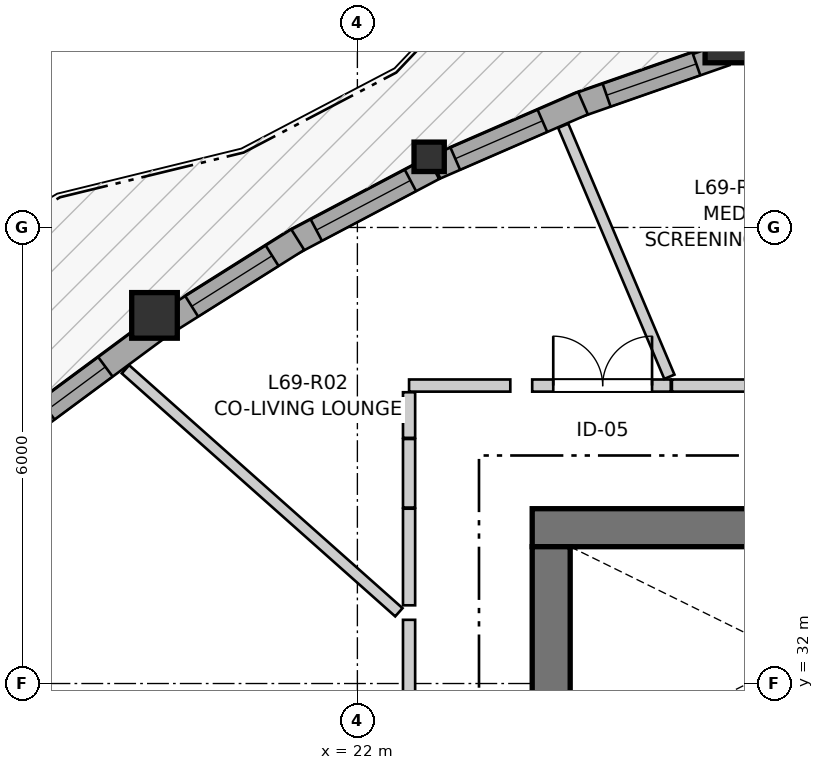
"""IFC4 building model, lengths in metres.
Left out: names, types, materials, properties, quantities, classifications, styles, units other than length and angle.
Written with IfcOpenShell. Run it as: python <this file> out.ifc"""

import sys

from ifc_helpers import new_model, si_unit, direction, frame, frame_2d, origin, origin_2d, place, context, subcontext, project, spatial, rectangle, i_section, extrude, source, transform, mapped, element, fill, save


model = new_model("IFC4")
c1 = context("Model", 3, precision=1e-05, world=origin(), true_north=direction((0.0, 1.0)))
c2 = subcontext(c1, "Body", "Model", "MODEL_VIEW")
j1 = project(units=[si_unit("LENGTHUNIT", "METRE"), si_unit("PLANEANGLEUNIT", "RADIAN")], contexts=[c1])
p1 = place(None, origin())
s1 = spatial("IfcSite", under=j1, at=p1, CompositionType="ELEMENT")
p2 = place(p1, origin())
s2 = spatial("IfcBuilding", under=s1, at=p2, CompositionType="ELEMENT")
p3 = place(p2, frame((0.0, 0.0, 230.8)))
s3 = spatial("IfcBuildingStorey", under=s2, at=p3, CompositionType="ELEMENT", Elevation=230.8)
p4 = place(p3, frame((36.4, 34.05, 0.0), z_axis=(0.0, 0.0, 1.0), x_axis=(-1.0, 0.0, 0.0)))
e1 = element("IfcWall", 1, at=p4, inside=s3, PredefinedType="SHEAR", context=c2, shape_type="SweptSolid", body=[
    extrude(rectangle(XDim=12.1, YDim=0.5, at=frame_2d((6.05, 0.0))), origin(), (0.0, 0.0, 1.0), 2.96),
])
p5 = place(p3, frame((24.55, 33.8, 0.0), z_axis=(0.0, 0.0, 1.0), x_axis=(0.0, -1.0, 0.0)))
e2 = element("IfcWall", 2, at=p5, inside=s3, PredefinedType="SHEAR", context=c2, shape_type="SweptSolid", body=[
    extrude(rectangle(XDim=15.6, YDim=0.5, at=frame_2d((7.8, 0.0))), origin(), (0.0, 0.0, 1.0), 2.96),
])
p6 = place(p5, frame((7.05, 0.0, 0.0)))
e3 = element("IfcOpeningElement", 3, at=p6, cuts=e2, PredefinedType="OPENING", context=c2, shape_type="SweptSolid", body=[
    extrude(rectangle(XDim=1.5, YDim=2.15, at=frame_2d((0.75, 1.075))), frame((0.0, 0.26, 0.0), z_axis=(0.0, -1.0, 0.0), x_axis=(1.0, 0.0, 0.0)), (0.0, 0.0, 1.0), 0.52),
])
p7 = place(p5, frame((3.52, 0.0, 0.0)))
e4 = element("IfcOpeningElement", 4, at=p7, cuts=e2, PredefinedType="OPENING", context=c2, shape_type="SweptSolid", body=[
    extrude(rectangle(XDim=0.86, YDim=2.05, at=frame_2d((0.43, 1.025))), frame((0.0, 0.26, 0.0), z_axis=(0.0, -1.0, 0.0), x_axis=(1.0, 0.0, 0.0)), (0.0, 0.0, 1.0), 0.52),
])
p8 = place(p5, frame((11.22, 0.0, 0.0)))
e5 = element("IfcOpeningElement", 5, at=p8, cuts=e2, PredefinedType="OPENING", context=c2, shape_type="SweptSolid", body=[
    extrude(rectangle(XDim=0.86, YDim=2.05, at=frame_2d((0.43, 1.025))), frame((0.0, 0.26, 0.0), z_axis=(0.0, -1.0, 0.0), x_axis=(1.0, 0.0, 0.0)), (0.0, 0.0, 1.0), 0.52),
])
m1 = source(origin(), c2, "Body", "SweptSolid", [
    extrude(rectangle(XDim=0.6, YDim=0.6, at=origin_2d()), origin(), (0.0, 0.0, 1.0), 2.96),
])
p9 = place(p3, frame((26.875, 40.467, 0.0), z_axis=(0.0, 0.0, 1.0), x_axis=(1.0, 0.0, 0.0)))
e6 = element("IfcColumn", 6, at=p9, inside=s3, PredefinedType="COLUMN", context=c2, shape_type="MappedRepresentation", body=[
    mapped(m1, transform((0.0, 0.0, 0.0), x_axis=(1.0, 0.0, 0.0), y_axis=(0.0, 1.0, 0.0), z_axis=(0.0, 0.0, 1.0), scale=1.0)),
])
m2 = source(origin(), c2, "Body", "SweptSolid", [
    extrude(i_section(OverallWidth=0.398, OverallDepth=0.387, WebThickness=0.019, FlangeThickness=0.03, FilletRadius=0.015, at=origin_2d()), origin(), (0.0, 0.0, 1.0), 2.96),
])
p10 = place(p3, frame((22.944, 38.929, 0.0), z_axis=(0.0, 0.0, 1.0), x_axis=(1.0, 0.0, 0.0)))
e7 = element("IfcColumn", 7, at=p10, inside=s3, PredefinedType="PILASTER", context=c2, shape_type="MappedRepresentation", body=[
    mapped(m2, transform((0.0, 0.0, 0.0), x_axis=(1.0, 0.0, 0.0), y_axis=(0.0, 1.0, 0.0), z_axis=(0.0, 0.0, 1.0), scale=1.0)),
])
p11 = place(p3, frame((19.331, 36.843, 0.0), z_axis=(0.0, 0.0, 1.0), x_axis=(1.0, 0.0, 0.0)))
e8 = element("IfcColumn", 8, at=p11, inside=s3, PredefinedType="COLUMN", context=c2, shape_type="MappedRepresentation", body=[
    mapped(m1, transform((0.0, 0.0, 0.0), x_axis=(1.0, 0.0, 0.0), y_axis=(0.0, 1.0, 0.0), z_axis=(0.0, 0.0, 1.0), scale=1.0)),
])
p12 = place(p3, frame((29.037, 40.885, 0.0), z_axis=(0.0, 0.0, 1.0), x_axis=(-0.965439872052, -0.260625887918, 0.0)))
e9 = element("IfcWall", 9, at=p12, inside=s3, PredefinedType="SOLIDWALL", context=c2, shape_type="SweptSolid", body=[
    extrude(rectangle(XDim=2.107, YDim=0.32, at=frame_2d((1.053, 0.0))), origin(), (0.0, 0.0, 1.0), 2.58),
])
p13 = place(p12, frame((0.24, 0.0, 0.0)))
e10 = element("IfcOpeningElement", 10, at=p13, cuts=e9, PredefinedType="OPENING", context=c2, shape_type="SweptSolid", body=[
    extrude(rectangle(XDim=1.0, YDim=2.1, at=frame_2d((0.5, 1.05))), frame((0.0, 0.17, 0.0), z_axis=(0.0, -1.0, 0.0), x_axis=(1.0, 0.0, 0.0)), (0.0, 0.0, 1.0), 0.34),
])
p14 = place(p3, frame((26.843, 40.286, 0.0), z_axis=(0.0, 0.0, 1.0), x_axis=(-0.944109796758, -0.329631144867, 0.0)))
e11 = element("IfcWall", 11, at=p14, inside=s3, PredefinedType="SOLIDWALL", context=c2, shape_type="SweptSolid", body=[
    extrude(rectangle(XDim=2.072, YDim=0.32, at=frame_2d((1.036, 0.0))), origin(), (0.0, 0.0, 1.0), 2.58),
])
p15 = place(p14, frame((0.406, 0.0, 0.82)))
e12 = element("IfcOpeningElement", 12, at=p15, cuts=e11, PredefinedType="OPENING", context=c2, shape_type="SweptSolid", body=[
    extrude(rectangle(XDim=1.25, YDim=1.35, at=frame_2d((0.625, 0.675))), frame((0.0, 0.17, 0.0), z_axis=(0.0, -1.0, 0.0), x_axis=(1.0, 0.0, 0.0)), (0.0, 0.0, 1.0), 0.34),
])
p16 = place(p3, frame((24.969, 39.635, 0.0), z_axis=(0.0, 0.0, 1.0), x_axis=(-0.917099379281, -0.398658661666, 0.0)))
e13 = element("IfcWall", 13, at=p16, inside=s3, PredefinedType="SOLIDWALL", context=c2, shape_type="SweptSolid", body=[
    extrude(rectangle(XDim=2.118, YDim=0.32, at=frame_2d((1.059, 0.0))), origin(), (0.0, 0.0, 1.0), 2.58),
])
p17 = place(p16, frame((0.582, 0.0, 0.82)))
e14 = element("IfcOpeningElement", 14, at=p17, cuts=e13, PredefinedType="OPENING", context=c2, shape_type="SweptSolid", body=[
    extrude(rectangle(XDim=1.25, YDim=1.35, at=frame_2d((0.625, 0.675))), frame((0.0, 0.17, 0.0), z_axis=(0.0, -1.0, 0.0), x_axis=(1.0, 0.0, 0.0)), (0.0, 0.0, 1.0), 0.34),
])
p18 = place(p3, frame((23.001, 38.779, 0.0), z_axis=(0.0, 0.0, 1.0), x_axis=(-0.884379435148, -0.466768695059, 0.0)))
e15 = element("IfcWall", 15, at=p18, inside=s3, PredefinedType="SOLIDWALL", context=c2, shape_type="SweptSolid", body=[
    extrude(rectangle(XDim=2.106, YDim=0.32, at=frame_2d((1.053, 0.0))), origin(), (0.0, 0.0, 1.0), 2.58),
])
p19 = place(p18, frame((0.343, 0.0, 0.82)))
e16 = element("IfcOpeningElement", 16, at=p19, cuts=e15, PredefinedType="OPENING", context=c2, shape_type="SweptSolid", body=[
    extrude(rectangle(XDim=1.4, YDim=1.35, at=frame_2d((0.7, 0.675))), frame((0.0, 0.17, 0.0), z_axis=(0.0, -1.0, 0.0), x_axis=(1.0, 0.0, 0.0)), (0.0, 0.0, 1.0), 0.34),
])
p20 = place(p3, frame((21.215, 37.84, 0.0), z_axis=(0.0, 0.0, 1.0), x_axis=(-0.846356989859, -0.532616039672, 0.0)))
e17 = element("IfcWall", 17, at=p20, inside=s3, PredefinedType="SOLIDWALL", context=c2, shape_type="SweptSolid", body=[
    extrude(rectangle(XDim=2.036, YDim=0.32, at=frame_2d((1.018, 0.0))), origin(), (0.0, 0.0, 1.0), 2.58),
])
p21 = place(p20, frame((0.398, 0.0, 0.82)))
e18 = element("IfcOpeningElement", 18, at=p21, cuts=e17, PredefinedType="OPENING", context=c2, shape_type="SweptSolid", body=[
    extrude(rectangle(XDim=1.25, YDim=1.35, at=frame_2d((0.625, 0.675))), frame((0.0, 0.17, 0.0), z_axis=(0.0, -1.0, 0.0), x_axis=(1.0, 0.0, 0.0)), (0.0, 0.0, 1.0), 0.34),
])
p22 = place(p3, frame((19.354, 36.661, 0.0), z_axis=(0.0, 0.0, 1.0), x_axis=(-0.803846460046, -0.59483684206, 0.0)))
e19 = element("IfcWall", 19, at=p22, inside=s3, PredefinedType="SOLIDWALL", context=c2, shape_type="SweptSolid", body=[
    extrude(rectangle(XDim=2.048, YDim=0.32, at=frame_2d((1.024, 0.0))), origin(), (0.0, 0.0, 1.0), 2.58),
])
p23 = place(p22, frame((0.832, 0.0, 0.82)))
e20 = element("IfcOpeningElement", 20, at=p23, cuts=e19, PredefinedType="OPENING", context=c2, shape_type="SweptSolid", body=[
    extrude(rectangle(XDim=0.95, YDim=1.35, at=frame_2d((0.475, 0.675))), frame((0.0, 0.17, 0.0), z_axis=(0.0, -1.0, 0.0), x_axis=(1.0, 0.0, 0.0)), (0.0, 0.0, 1.0), 0.34),
])
p24 = place(p3, frame((26.138, 35.92, 0.0), z_axis=(0.0, 0.0, 1.0), x_axis=(1.0, 0.0, 0.0)))
e21 = element("IfcWall", 21, at=p24, inside=s3, PredefinedType="PARTITIONING", context=c2, shape_type="SweptSolid", body=[
    extrude(rectangle(XDim=5.328, YDim=0.16, at=frame_2d((2.664, 0.0))), origin(), (0.0, 0.0, 1.0), 2.96),
])
p25 = place(p24, frame((2.185, 0.0, 0.0)))
e22 = element("IfcOpeningElement", 22, at=p25, cuts=e21, PredefinedType="OPENING", context=c2, shape_type="SweptSolid", body=[
    extrude(rectangle(XDim=0.96, YDim=2.1, at=frame_2d((0.48, 1.05))), frame((0.0, 0.09, 0.0), z_axis=(0.0, -1.0, 0.0), x_axis=(1.0, 0.0, 0.0)), (0.0, 0.0, 1.0), 0.18),
])
p26 = place(p3, frame((22.68, 27.85, 0.0), z_axis=(0.0, 0.0, 1.0), x_axis=(0.0, 1.0, 0.0)))
e23 = element("IfcWall", 23, at=p26, inside=s3, PredefinedType="PARTITIONING", context=c2, shape_type="SweptSolid", body=[
    extrude(rectangle(XDim=4.988, YDim=0.16, at=frame_2d((2.494, 0.0))), origin(), (0.0, 0.0, 1.0), 2.96),
])
p27 = place(p26, frame((2.033, 0.0, 0.0)))
e24 = element("IfcOpeningElement", 24, at=p27, cuts=e23, PredefinedType="OPENING", context=c2, shape_type="SweptSolid", body=[
    extrude(rectangle(XDim=0.96, YDim=2.1, at=frame_2d((0.48, 1.05))), frame((0.0, 0.09, 0.0), z_axis=(0.0, -1.0, 0.0), x_axis=(1.0, 0.0, 0.0)), (0.0, 0.0, 1.0), 0.18),
])
p28 = place(p3, frame((24.3, 35.92, 0.0), z_axis=(0.0, 0.0, 1.0), x_axis=(1.0, 0.0, 0.0)))
e25 = element("IfcWall", 25, at=p28, inside=s3, PredefinedType="PARTITIONING", context=c2, shape_type="SweptSolid", body=[
    extrude(rectangle(XDim=1.823, YDim=0.16, at=frame_2d((0.912, 0.0))), origin(), (0.0, 0.0, 1.0), 2.96),
])
p29 = place(p28, frame((0.277, 0.0, 0.0)))
e26 = element("IfcOpeningElement", 26, at=p29, cuts=e25, PredefinedType="OPENING", context=c2, shape_type="SweptSolid", body=[
    extrude(rectangle(XDim=1.3, YDim=2.1, at=frame_2d((0.65, 1.05))), frame((0.0, 0.09, 0.0), z_axis=(0.0, -1.0, 0.0), x_axis=(1.0, 0.0, 0.0)), (0.0, 0.0, 1.0), 0.18),
])
p30 = place(p3, frame((18.949, 36.134, 0.0), z_axis=(0.0, 0.0, 1.0), x_axis=(0.747482088067, -0.664281964243, 0.0)))
e27 = element("IfcWall", 27, at=p30, inside=s3, PredefinedType="PARTITIONING", context=c2, shape_type="SweptSolid", body=[
    extrude(rectangle(XDim=4.812, YDim=0.145, at=frame_2d((2.406, 0.0))), origin(), (0.0, 0.0, 1.0), 2.96),
])
p31 = place(p3, frame((24.708, 39.338, 0.0), z_axis=(0.0, 0.0, 1.0), x_axis=(0.389551136954, -0.921004838043, 0.0)))
e28 = element("IfcWall", 28, at=p31, inside=s3, PredefinedType="PARTITIONING", context=c2, shape_type="SweptSolid", body=[
    extrude(rectangle(XDim=3.585, YDim=0.145, at=frame_2d((1.793, 0.0))), origin(), (0.0, 0.0, 1.0), 2.96),
])
p32 = place(p3, frame((22.68, 33.029, 0.0), z_axis=(0.0, 0.0, 1.0), x_axis=(0.0, 1.0, 0.0)))
e29 = element("IfcWall", 29, at=p32, inside=s3, PredefinedType="PARTITIONING", context=c2, shape_type="SweptSolid", body=[
    extrude(rectangle(XDim=1.271, YDim=0.16, at=frame_2d((0.635, 0.0))), origin(), (0.0, 0.0, 1.0), 2.628),
])
p33 = place(p3, frame((22.68, 35.92, 0.0), z_axis=(0.0, 0.0, 1.0), x_axis=(1.0, 0.0, 0.0)))
e30 = element("IfcWall", 30, at=p33, inside=s3, PredefinedType="PARTITIONING", context=c2, shape_type="SweptSolid", body=[
    extrude(rectangle(XDim=1.332, YDim=0.16, at=frame_2d((0.666, 0.0))), origin(), (0.0, 0.0, 1.0), 2.96),
])
p34 = place(p3, frame((22.68, 34.315, 0.0), z_axis=(0.0, 0.0, 1.0), x_axis=(0.0, 1.0, 0.0)))
e31 = element("IfcWall", 31, at=p34, inside=s3, PredefinedType="PARTITIONING", context=c2, shape_type="SweptSolid", body=[
    extrude(rectangle(XDim=0.902, YDim=0.16, at=frame_2d((0.451, 0.0))), origin(), (0.0, 0.0, 1.0), 2.96),
])
p35 = place(p3, frame((22.68, 35.232, 0.0), z_axis=(0.0, 0.0, 1.0), x_axis=(0.0, 1.0, 0.0)))
e32 = element("IfcWall", 32, at=p35, inside=s3, PredefinedType="PARTITIONING", context=c2, shape_type="SweptSolid", body=[
    extrude(rectangle(XDim=0.6, YDim=0.16, at=frame_2d((0.3, 0.0))), origin(), (0.0, 0.0, 1.0), 2.96),
])
m3 = source(origin(), c2, "Body", "SweptSolid", [
    extrude(rectangle(XDim=1.25, YDim=1.35, at=frame_2d((0.625, 0.675))), frame((0.0, 0.03, 0.0), z_axis=(0.0, -1.0, 0.0), x_axis=(1.0, 0.0, 0.0)), (0.0, 0.0, 1.0), 0.06),
])
p36 = place(p15, origin())
e33 = element("IfcWindow", 33, at=p36, inside=s3, PartitioningType="SINGLE_PANEL", PredefinedType="WINDOW", context=c2, shape_type="MappedRepresentation", body=[
    mapped(m3, transform((0.0, 0.0, 0.0), x_axis=(1.0, 0.0, 0.0), y_axis=(0.0, 1.0, 0.0), z_axis=(0.0, 0.0, 1.0), scale=1.0)),
])
fill(e12, e33)
p37 = place(p17, origin())
e34 = element("IfcWindow", 34, at=p37, inside=s3, PartitioningType="SINGLE_PANEL", PredefinedType="WINDOW", context=c2, shape_type="MappedRepresentation", body=[
    mapped(m3, transform((0.0, 0.0, 0.0), x_axis=(1.0, 0.0, 0.0), y_axis=(0.0, 1.0, 0.0), z_axis=(0.0, 0.0, 1.0), scale=1.0)),
])
fill(e14, e34)
m4 = source(origin(), c2, "Body", "SweptSolid", [
    extrude(rectangle(XDim=1.4, YDim=1.35, at=frame_2d((0.7, 0.675))), frame((0.0, 0.03, 0.0), z_axis=(0.0, -1.0, 0.0), x_axis=(1.0, 0.0, 0.0)), (0.0, 0.0, 1.0), 0.06),
])
p38 = place(p19, origin())
e35 = element("IfcWindow", 35, at=p38, inside=s3, PartitioningType="SINGLE_PANEL", PredefinedType="WINDOW", context=c2, shape_type="MappedRepresentation", body=[
    mapped(m4, transform((0.0, 0.0, 0.0), x_axis=(1.0, 0.0, 0.0), y_axis=(0.0, 1.0, 0.0), z_axis=(0.0, 0.0, 1.0), scale=1.0)),
])
fill(e16, e35)
p39 = place(p21, origin())
e36 = element("IfcWindow", 36, at=p39, inside=s3, PartitioningType="SINGLE_PANEL", PredefinedType="WINDOW", context=c2, shape_type="MappedRepresentation", body=[
    mapped(m3, transform((0.0, 0.0, 0.0), x_axis=(1.0, 0.0, 0.0), y_axis=(0.0, 1.0, 0.0), z_axis=(0.0, 0.0, 1.0), scale=1.0)),
])
fill(e18, e36)
m5 = source(origin(), c2, "Body", "SweptSolid", [
    extrude(rectangle(XDim=0.95, YDim=1.35, at=frame_2d((0.475, 0.675))), frame((0.0, 0.03, 0.0), z_axis=(0.0, -1.0, 0.0), x_axis=(1.0, 0.0, 0.0)), (0.0, 0.0, 1.0), 0.06),
])
p40 = place(p23, origin())
e37 = element("IfcWindow", 37, at=p40, inside=s3, PartitioningType="SINGLE_PANEL", PredefinedType="WINDOW", context=c2, shape_type="MappedRepresentation", body=[
    mapped(m5, transform((0.0, 0.0, 0.0), x_axis=(1.0, 0.0, 0.0), y_axis=(0.0, 1.0, 0.0), z_axis=(0.0, 0.0, 1.0), scale=1.0)),
])
fill(e20, e37)
m6 = source(origin(), c2, "Body", "SweptSolid", [
    extrude(rectangle(XDim=1.3, YDim=2.1, at=frame_2d((0.65, 1.05))), frame((0.0, 0.025, 0.0), z_axis=(0.0, -1.0, 0.0), x_axis=(1.0, 0.0, 0.0)), (0.0, 0.0, 1.0), 0.05),
])
p41 = place(p29, origin())
e38 = element("IfcDoor", 38, at=p41, inside=s3, OperationType="DOUBLE_DOOR_SINGLE_SWING", PredefinedType="DOOR", context=c2, shape_type="MappedRepresentation", body=[
    mapped(m6, transform((0.0, 0.0, 0.0), x_axis=(1.0, 0.0, 0.0), y_axis=(0.0, 1.0, 0.0), z_axis=(0.0, 0.0, 1.0), scale=1.0)),
])
fill(e26, e38)
save(model, sys.argv[1])
